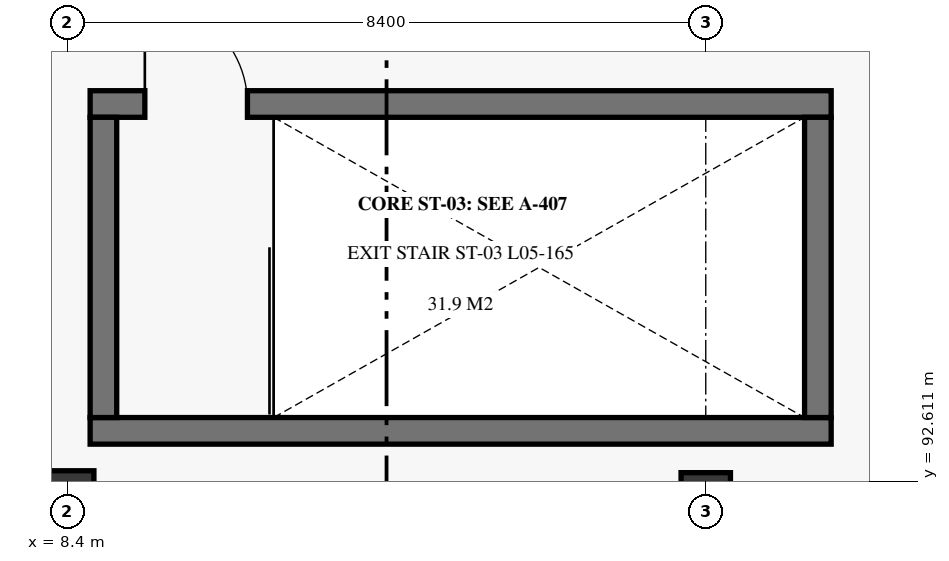
"""IFC4 building model, lengths in metres.
Left out: names, types, materials, properties, quantities, classifications, styles, units other than length and angle.
Written with IfcOpenShell. Run it as: python <this file> out.ifc"""

import sys

from ifc_helpers import new_model, si_unit, direction, frame, frame_2d, origin, origin_2d, place, context, subcontext, project, spatial, rectangle, extrude, element, fill, save


model = new_model("IFC4")
c1 = context("Model", 3, precision=1e-05, world=origin(), true_north=direction((0.0, 1.0)))
c2 = subcontext(c1, "Body", "Model", "MODEL_VIEW")
j1 = project(units=[si_unit("LENGTHUNIT", "METRE"), si_unit("PLANEANGLEUNIT", "RADIAN")], contexts=[c1])
p1 = place(None, origin())
s1 = spatial("IfcSite", under=j1, at=p1, CompositionType="ELEMENT")
p2 = place(p1, origin())
s2 = spatial("IfcBuilding", under=s1, at=p2, CompositionType="ELEMENT")
p3 = place(p2, frame((0.0, 0.0, 22.2)))
s3 = spatial("IfcBuildingStorey", under=s2, at=p3, CompositionType="ELEMENT", Elevation=22.2)
p4 = place(p3, frame((8.4, 92.4, 0.0), z_axis=(0.0, 0.0, 1.0), x_axis=(1.0, 0.0, 0.0)))
e1 = element("IfcColumn", 1, at=p4, inside=s3, PredefinedType="COLUMN", context=c2, shape_type="SweptSolid", body=[
    extrude(rectangle(XDim=0.7, YDim=0.7, at=origin_2d()), origin(), (0.0, 0.0, 1.0), 4.22),
])
p5 = place(p3, frame((16.8, 92.4, 0.0), z_axis=(0.0, 0.0, 1.0), x_axis=(1.0, 0.0, 0.0)))
e2 = element("IfcColumn", 2, at=p5, inside=s3, PredefinedType="COLUMN", context=c2, shape_type="SweptSolid", body=[
    extrude(rectangle(XDim=0.65, YDim=0.65, at=origin_2d()), origin(), (0.0, 0.0, 1.0), 4.22),
])
p6 = place(p3, frame((8.7, 93.275, 0.0), z_axis=(0.0, 0.0, 1.0), x_axis=(1.0, 0.0, 0.0)))
e3 = element("IfcWall", 3, at=p6, inside=s3, PredefinedType="SHEAR", context=c2, shape_type="SweptSolid", body=[
    extrude(rectangle(XDim=9.75, YDim=0.35, at=frame_2d((4.875, 0.0))), origin(), (0.0, 0.0, 1.0), 4.22),
])
p7 = place(p3, frame((8.7, 97.575, 0.0), z_axis=(0.0, 0.0, 1.0), x_axis=(1.0, 0.0, 0.0)))
e4 = element("IfcWall", 4, at=p7, inside=s3, PredefinedType="SHEAR", context=c2, shape_type="SweptSolid", body=[
    extrude(rectangle(XDim=9.75, YDim=0.35, at=frame_2d((4.875, 0.0))), origin(), (0.0, 0.0, 1.0), 4.22),
])
p8 = place(p7, frame((0.72, 0.0, 0.0)))
e5 = element("IfcOpeningElement", 5, at=p8, cuts=e4, PredefinedType="OPENING", context=c2, shape_type="SweptSolid", body=[
    extrude(rectangle(XDim=1.35, YDim=2.25, at=frame_2d((0.675, 1.125))), frame((0.0, 0.185, 0.0), z_axis=(0.0, -1.0, 0.0), x_axis=(1.0, 0.0, 0.0)), (0.0, 0.0, 1.0), 0.37),
])
for number, where, z_axis, x_axis in (
    (6, (8.875, 93.45, 0.0), (0.0, 0.0, 1.0), (0.0, 1.0, 0.0)),
    (7, (18.275, 93.45, 0.0), (0.0, 0.0, 1.0), (0.0, 1.0, 0.0)),
):
    element("IfcWall", number, at=place(p3, frame(where, z_axis=z_axis, x_axis=x_axis)), inside=s3, PredefinedType="SHEAR", context=c2, shape_type="SweptSolid", body=[
        extrude(rectangle(XDim=3.95, YDim=0.35, at=frame_2d((1.975, 0.0))), origin(), (0.0, 0.0, 1.0), 4.22),
    ])
p9 = place(p8, origin())
e8 = element("IfcDoor", 8, at=p9, inside=s3, OperationType="SINGLE_SWING_LEFT", PredefinedType="DOOR", context=c2, shape_type="SweptSolid", body=[
    extrude(rectangle(XDim=1.35, YDim=2.25, at=frame_2d((0.675, 1.125))), frame((0.0, 0.025, 0.0), z_axis=(0.0, -1.0, 0.0), x_axis=(1.0, 0.0, 0.0)), (0.0, 0.0, 1.0), 0.05),
])
fill(e5, e8)
save(model, sys.argv[1])
